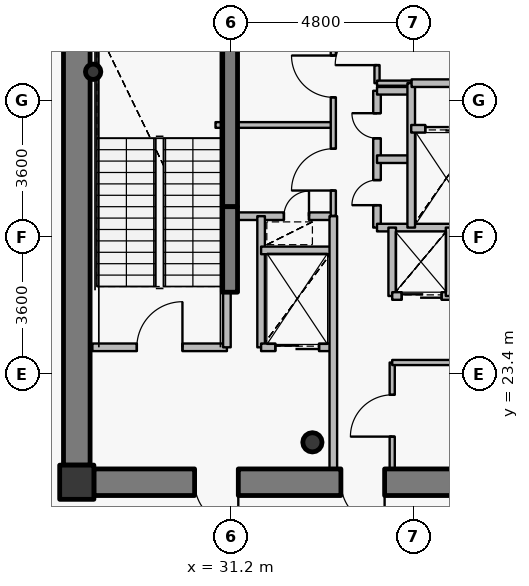
"""IFC4 building model, lengths in metres.
Left out: names, types, materials, properties, quantities, classifications, styles, units other than length and angle.
Written with IfcOpenShell. Run it as: python <this file> out.ifc"""

import sys

from ifc_helpers import new_model, si_unit, direction, frame, frame_2d, origin, origin_2d, place, context, subcontext, project, spatial, rectangle, hollow_circle, extrude, source, transform, mapped, element, fill, save


model = new_model("IFC4")
c1 = context("Model", 3, precision=1e-05, world=origin(), true_north=direction((0.0, 1.0)))
c2 = subcontext(c1, "Body", "Model", "MODEL_VIEW")
j1 = project(units=[si_unit("LENGTHUNIT", "METRE"), si_unit("PLANEANGLEUNIT", "RADIAN")], contexts=[c1])
p1 = place(None, origin())
s1 = spatial("IfcSite", under=j1, at=p1, CompositionType="ELEMENT")
p2 = place(p1, origin())
s2 = spatial("IfcBuilding", under=s1, at=p2, CompositionType="ELEMENT")
p3 = place(p2, frame((0.0, 0.0, 355.2)))
s3 = spatial("IfcBuildingStorey", under=s2, at=p3, CompositionType="ELEMENT", Elevation=355.2)
p4 = place(p3, frame((27.15, 20.55, 0.0), z_axis=(0.0, 0.0, 1.0), x_axis=(1.0, 0.0, 0.0)))
e1 = element("IfcColumn", 1, at=p4, inside=s3, PredefinedType="COLUMN", context=c2, shape_type="SweptSolid", body=[
    extrude(rectangle(XDim=0.9, YDim=0.9, at=origin_2d()), origin(), (0.0, 0.0, 1.0), 4.2),
])
p5 = place(p3, frame((33.35, 21.6, 0.0), z_axis=(0.0, 0.0, 1.0), x_axis=(1.0, 0.0, 0.0)))
e2 = element("IfcColumn", 2, at=p5, inside=s3, PredefinedType="COLUMN", context=c2, shape_type="SweptSolid", body=[
    extrude(hollow_circle(Radius=0.254, WallThickness=0.02, at=origin_2d()), origin(), (0.0, 0.0, 1.0), 4.2),
])
p6 = place(p3, frame((31.18, 27.8, 0.0), z_axis=(0.0, 0.0, 1.0), x_axis=(0.0, 1.0, 0.0)))
e3 = element("IfcWall", 3, at=p6, inside=s3, PredefinedType="SHEAR", context=c2, shape_type="SweptSolid", body=[
    extrude(rectangle(XDim=4.75, YDim=0.4, at=frame_2d((2.375, 0.0))), origin(), (0.0, 0.0, 1.0), 4.2),
])
p7 = place(p3, frame((27.58, 31.35, 0.0), z_axis=(0.0, 0.0, 1.0), x_axis=(1.0, 0.0, 0.0)))
e4 = element("IfcColumn", 4, at=p7, inside=s3, PredefinedType="COLUMN", context=c2, shape_type="SweptSolid", body=[
    extrude(hollow_circle(Radius=0.203, WallThickness=0.016, at=origin_2d()), origin(), (0.0, 0.0, 1.0), 4.2),
])
p8 = place(p3, frame((44.4, 20.55, 0.0), z_axis=(0.0, 0.0, 1.0), x_axis=(-1.0, 0.0, 0.0)))
e5 = element("IfcWall", 5, at=p8, inside=s3, PredefinedType="SHEAR", context=c2, shape_type="SweptSolid", body=[
    extrude(rectangle(XDim=16.8, YDim=0.7, at=frame_2d((8.4, 0.0))), origin(), (0.0, 0.0, 1.0), 3.5),
])
p9 = place(p8, frame((13.0, 0.0, 0.0)))
e6 = element("IfcOpeningElement", 6, at=p9, cuts=e5, PredefinedType="OPENING", context=c2, shape_type="SweptSolid", body=[
    extrude(rectangle(XDim=1.15, YDim=2.15, at=origin_2d()), frame((0.575, 0.36, 1.075), z_axis=(0.0, -1.0, 0.0), x_axis=(1.0, 0.0, 0.0)), (0.0, 0.0, 1.0), 0.72),
])
p10 = place(p8, frame((9.15, 0.0, 0.0)))
e7 = element("IfcOpeningElement", 7, at=p10, cuts=e5, PredefinedType="OPENING", context=c2, shape_type="SweptSolid", body=[
    extrude(rectangle(XDim=1.15, YDim=2.15, at=origin_2d()), frame((0.575, 0.36, 1.075), z_axis=(0.0, -1.0, 0.0), x_axis=(1.0, 0.0, 0.0)), (0.0, 0.0, 1.0), 0.72),
])
p11 = place(p3, frame((27.15, 21.0, 0.0), z_axis=(0.0, 0.0, 1.0), x_axis=(0.0, 1.0, 0.0)))
e8 = element("IfcWall", 8, at=p11, inside=s3, PredefinedType="SHEAR", context=c2, shape_type="SweptSolid", body=[
    extrude(rectangle(XDim=12.0, YDim=0.7, at=frame_2d((6.0, 0.0))), origin(), (0.0, 0.0, 1.0), 3.5),
])
p12 = place(p3, frame((31.18, 25.55, 0.0), z_axis=(0.0, 0.0, 1.0), x_axis=(0.0, 1.0, 0.0)))
e9 = element("IfcWall", 9, at=p12, inside=s3, PredefinedType="SHEAR", context=c2, shape_type="SweptSolid", body=[
    extrude(rectangle(XDim=2.25, YDim=0.4, at=frame_2d((1.125, 0.0))), origin(), (0.0, 0.0, 1.0), 3.55),
])
p13 = place(p3, frame((27.56, 24.1, 0.0), z_axis=(0.0, 0.0, 1.0), x_axis=(1.0, 0.0, 0.0)))
e10 = element("IfcWall", 10, at=p13, inside=s3, PredefinedType="PARTITIONING", context=c2, shape_type="SweptSolid", body=[
    extrude(rectangle(XDim=3.54, YDim=0.2, at=frame_2d((1.77, 0.0))), origin(), (0.0, 0.0, 1.0), 3.95),
])
p14 = place(p13, frame((1.17, 0.0, 0.0)))
e11 = element("IfcOpeningElement", 11, at=p14, cuts=e10, PredefinedType="OPENING", context=c2, shape_type="SweptSolid", body=[
    extrude(rectangle(XDim=1.2, YDim=2.15, at=origin_2d()), frame((0.6, 0.11, 1.075), z_axis=(0.0, -1.0, 0.0), x_axis=(1.0, 0.0, 0.0)), (0.0, 0.0, 1.0), 0.22),
])
p15 = place(p3, frame((30.8, 29.95, 0.0), z_axis=(0.0, 0.0, 1.0), x_axis=(1.0, 0.0, 0.0)))
e12 = element("IfcWall", 12, at=p15, inside=s3, PredefinedType="PARTITIONING", context=c2, shape_type="SweptSolid", body=[
    extrude(rectangle(XDim=3.1, YDim=0.15, at=frame_2d((1.55, 0.0))), origin(), (0.0, 0.0, 1.0), 3.535),
])
p16 = place(p3, frame((31.1, 24.1, 0.0), z_axis=(0.0, 0.0, 1.0), x_axis=(0.0, 1.0, 0.0)))
e13 = element("IfcWall", 13, at=p16, inside=s3, PredefinedType="PARTITIONING", context=c2, shape_type="SweptSolid", body=[
    extrude(rectangle(XDim=1.44, YDim=0.2, at=frame_2d((0.72, 0.0))), origin(), (0.0, 0.0, 1.0), 3.95),
])
p17 = place(p3, frame((31.1, 27.55, 0.0), z_axis=(0.0, 0.0, 1.0), x_axis=(1.0, 0.0, 0.0)))
e14 = element("IfcWall", 14, at=p17, inside=s3, PredefinedType="PARTITIONING", context=c2, shape_type="SweptSolid", body=[
    extrude(rectangle(XDim=2.8, YDim=0.2, at=frame_2d((1.4, 0.0))), origin(), (0.0, 0.0, 1.0), 3.535),
])
p18 = place(p17, frame((1.5, 0.0, 0.0)))
e15 = element("IfcOpeningElement", 15, at=p18, cuts=e14, PredefinedType="OPENING", context=c2, shape_type="SweptSolid", body=[
    extrude(rectangle(XDim=0.66, YDim=2.05, at=origin_2d()), frame((0.33, 0.11, 1.025), z_axis=(0.0, -1.0, 0.0), x_axis=(1.0, 0.0, 0.0)), (0.0, 0.0, 1.0), 0.22),
])
p19 = place(p3, frame((32.0, 24.1, 0.0), z_axis=(0.0, 0.0, 1.0), x_axis=(0.0, 1.0, 0.0)))
e16 = element("IfcWall", 16, at=p19, inside=s3, PredefinedType="PARTITIONING", context=c2, shape_type="SweptSolid", body=[
    extrude(rectangle(XDim=3.45, YDim=0.2, at=frame_2d((1.725, 0.0))), origin(), (0.0, 0.0, 1.0), 3.95),
])
p20 = place(p3, frame((32.0, 24.1, 0.0), z_axis=(0.0, 0.0, 1.0), x_axis=(1.0, 0.0, 0.0)))
e17 = element("IfcWall", 17, at=p20, inside=s3, PredefinedType="PARTITIONING", context=c2, shape_type="SweptSolid", body=[
    extrude(rectangle(XDim=1.9, YDim=0.2, at=frame_2d((0.95, 0.0))), origin(), (0.0, 0.0, 1.0), 3.535),
])
p21 = place(p20, frame((0.375, 0.0, 0.0)))
e18 = element("IfcOpeningElement", 18, at=p21, cuts=e17, PredefinedType="OPENING", context=c2, shape_type="SweptSolid", body=[
    extrude(rectangle(XDim=1.15, YDim=2.15, at=origin_2d()), frame((0.575, 0.11, 1.075), z_axis=(0.0, -1.0, 0.0), x_axis=(1.0, 0.0, 0.0)), (0.0, 0.0, 1.0), 0.22),
])
p22 = place(p3, frame((32.0, 26.65, 0.0), z_axis=(0.0, 0.0, 1.0), x_axis=(1.0, 0.0, 0.0)))
e19 = element("IfcWall", 19, at=p22, inside=s3, PredefinedType="PARTITIONING", context=c2, shape_type="SweptSolid", body=[
    extrude(rectangle(XDim=1.9, YDim=0.2, at=frame_2d((0.95, 0.0))), origin(), (0.0, 0.0, 1.0), 3.535),
])
p23 = place(p3, frame((33.9, 20.9, 0.0), z_axis=(0.0, 0.0, 1.0), x_axis=(0.0, 1.0, 0.0)))
e20 = element("IfcWall", 20, at=p23, inside=s3, PredefinedType="PARTITIONING", context=c2, shape_type="SweptSolid", body=[
    extrude(rectangle(XDim=6.65, YDim=0.2, at=frame_2d((3.325, 0.0))), origin(), (0.0, 0.0, 1.0), 3.535),
])
p24 = place(p3, frame((33.9, 27.56, 0.0), z_axis=(0.0, 0.0, 1.0), x_axis=(0.0, 1.0, 0.0)))
e21 = element("IfcWall", 21, at=p24, inside=s3, PredefinedType="PARTITIONING", context=c2, shape_type="SweptSolid", body=[
    extrude(rectangle(XDim=5.54, YDim=0.135, at=frame_2d((2.77, 0.0))), origin(), (0.0, 0.0, 1.0), 3.535),
])
p25 = place(p24, frame((0.665, 0.0, 0.0)))
e22 = element("IfcOpeningElement", 22, at=p25, cuts=e21, PredefinedType="OPENING", context=c2, shape_type="SweptSolid", body=[
    extrude(rectangle(XDim=1.1, YDim=2.15, at=origin_2d()), frame((0.55, 0.078, 1.075), z_axis=(0.0, -1.0, 0.0), x_axis=(1.0, 0.0, 0.0)), (0.0, 0.0, 1.0), 0.155),
])
p26 = place(p24, frame((3.117, 0.0, 0.0)))
e23 = element("IfcOpeningElement", 23, at=p26, cuts=e21, PredefinedType="OPENING", context=c2, shape_type="SweptSolid", body=[
    extrude(rectangle(XDim=1.1, YDim=2.15, at=origin_2d()), frame((0.55, 0.078, 1.075), z_axis=(0.0, -1.0, 0.0), x_axis=(1.0, 0.0, 0.0)), (0.0, 0.0, 1.0), 0.155),
])
p27 = place(p3, frame((35.05, 27.25, 0.0), z_axis=(0.0, 0.0, 1.0), x_axis=(0.0, 1.0, 0.0)))
e24 = element("IfcWall", 24, at=p27, inside=s3, PredefinedType="PARTITIONING", context=c2, shape_type="SweptSolid", body=[
    extrude(rectangle(XDim=3.6, YDim=0.2, at=frame_2d((1.8, 0.0))), origin(), (0.0, 0.0, 1.0), 3.95),
])
p28 = place(p27, frame((0.59, 0.0, 0.0)))
e25 = element("IfcOpeningElement", 25, at=p28, cuts=e24, PredefinedType="OPENING", context=c2, shape_type="SweptSolid", body=[
    extrude(rectangle(XDim=0.66, YDim=2.05, at=origin_2d()), frame((0.33, 0.11, 1.025), z_axis=(0.0, -1.0, 0.0), x_axis=(1.0, 0.0, 0.0)), (0.0, 0.0, 1.0), 0.22),
])
p29 = place(p27, frame((2.35, 0.0, 0.0)))
e26 = element("IfcOpeningElement", 26, at=p29, cuts=e24, PredefinedType="OPENING", context=c2, shape_type="SweptSolid", body=[
    extrude(rectangle(XDim=0.66, YDim=2.05, at=origin_2d()), frame((0.33, 0.11, 1.025), z_axis=(0.0, -1.0, 0.0), x_axis=(1.0, 0.0, 0.0)), (0.0, 0.0, 1.0), 0.22),
])
p30 = place(p3, frame((35.05, 27.25, 0.0), z_axis=(0.0, 0.0, 1.0), x_axis=(1.0, 0.0, 0.0)))
e27 = element("IfcWall", 27, at=p30, inside=s3, PredefinedType="PARTITIONING", context=c2, shape_type="SweptSolid", body=[
    extrude(rectangle(XDim=4.95, YDim=0.2, at=frame_2d((2.475, 0.0))), origin(), (0.0, 0.0, 1.0), 3.535),
])
for number, where, z_axis, x_axis in (
    (28, (35.05, 29.05, 0.0), (0.0, 0.0, 1.0), (1.0, 0.0, 0.0)),
    (29, (35.05, 30.85, 0.0), (0.0, 0.0, 1.0), (1.0, 0.0, 0.0)),
):
    element("IfcWall", number, at=place(p3, frame(where, z_axis=z_axis, x_axis=x_axis)), inside=s3, PredefinedType="PARTITIONING", context=c2, shape_type="SweptSolid", body=[
        extrude(rectangle(XDim=0.9, YDim=0.2, at=frame_2d((0.45, 0.0))), origin(), (0.0, 0.0, 1.0), 3.95),
    ])
p31 = place(p3, frame((35.05, 31.05, 0.0), z_axis=(0.0, 0.0, 1.0), x_axis=(0.0, 1.0, 0.0)))
e30 = element("IfcWall", 30, at=p31, inside=s3, PredefinedType="PARTITIONING", context=c2, shape_type="SweptSolid", body=[
    extrude(rectangle(XDim=2.05, YDim=0.135, at=frame_2d((1.025, 0.0))), origin(), (0.0, 0.0, 1.0), 3.535),
])
p32 = place(p31, frame((0.475, 0.0, 0.0)))
e31 = element("IfcOpeningElement", 31, at=p32, cuts=e30, PredefinedType="OPENING", context=c2, shape_type="SweptSolid", body=[
    extrude(rectangle(XDim=1.1, YDim=2.15, at=origin_2d()), frame((0.55, 0.078, 1.075), z_axis=(0.0, -1.0, 0.0), x_axis=(1.0, 0.0, 0.0)), (0.0, 0.0, 1.0), 0.155),
])
p33 = place(p3, frame((35.05, 31.05, 0.0), z_axis=(0.0, 0.0, 1.0), x_axis=(1.0, 0.0, 0.0)))
e32 = element("IfcWall", 32, at=p33, inside=s3, PredefinedType="PARTITIONING", context=c2, shape_type="SweptSolid", body=[
    extrude(rectangle(XDim=0.9, YDim=0.135, at=frame_2d((0.45, 0.0))), origin(), (0.0, 0.0, 1.0), 3.95),
])
p34 = place(p3, frame((35.45, 20.9, 0.0), z_axis=(0.0, 0.0, 1.0), x_axis=(0.0, 1.0, 0.0)))
e33 = element("IfcWall", 33, at=p34, inside=s3, PredefinedType="PARTITIONING", context=c2, shape_type="SweptSolid", body=[
    extrude(rectangle(XDim=2.8, YDim=0.135, at=frame_2d((1.4, 0.0))), origin(), (0.0, 0.0, 1.0), 3.535),
])
p35 = place(p34, frame((0.85, 0.0, 0.0)))
e34 = element("IfcOpeningElement", 34, at=p35, cuts=e33, PredefinedType="OPENING", context=c2, shape_type="SweptSolid", body=[
    extrude(rectangle(XDim=1.1, YDim=2.15, at=origin_2d()), frame((0.55, 0.078, 1.075), z_axis=(0.0, -1.0, 0.0), x_axis=(1.0, 0.0, 0.0)), (0.0, 0.0, 1.0), 0.155),
])
p36 = place(p3, frame((35.45, 23.7, 0.0), z_axis=(0.0, 0.0, 1.0), x_axis=(1.0, 0.0, 0.0)))
e35 = element("IfcWall", 35, at=p36, inside=s3, PredefinedType="PARTITIONING", context=c2, shape_type="SweptSolid", body=[
    extrude(rectangle(XDim=4.35, YDim=0.135, at=frame_2d((2.175, 0.0))), origin(), (0.0, 0.0, 1.0), 3.535),
])
p37 = place(p36, frame((2.905, 0.0, 0.0)))
e36 = element("IfcOpeningElement", 36, at=p37, cuts=e35, PredefinedType="OPENING", context=c2, shape_type="SweptSolid", body=[
    extrude(rectangle(XDim=1.1, YDim=2.15, at=origin_2d()), frame((0.55, 0.078, 1.075), z_axis=(0.0, -1.0, 0.0), x_axis=(1.0, 0.0, 0.0)), (0.0, 0.0, 1.0), 0.155),
])
p38 = place(p3, frame((35.45, 25.45, 0.0), z_axis=(0.0, 0.0, 1.0), x_axis=(0.0, 1.0, 0.0)))
e37 = element("IfcWall", 37, at=p38, inside=s3, PredefinedType="PARTITIONING", context=c2, shape_type="SweptSolid", body=[
    extrude(rectangle(XDim=1.8, YDim=0.2, at=frame_2d((0.9, 0.0))), origin(), (0.0, 0.0, 1.0), 3.95),
])
p39 = place(p3, frame((35.45, 25.45, 0.0), z_axis=(0.0, 0.0, 1.0), x_axis=(1.0, 0.0, 0.0)))
e38 = element("IfcWall", 38, at=p39, inside=s3, PredefinedType="PARTITIONING", context=c2, shape_type="SweptSolid", body=[
    extrude(rectangle(XDim=4.55, YDim=0.2, at=frame_2d((2.275, 0.0))), origin(), (0.0, 0.0, 1.0), 3.535),
])
p40 = place(p39, frame((0.25, 0.0, 0.0)))
e39 = element("IfcOpeningElement", 39, at=p40, cuts=e38, PredefinedType="OPENING", context=c2, shape_type="SweptSolid", body=[
    extrude(rectangle(XDim=1.05, YDim=2.15, at=origin_2d()), frame((0.525, 0.11, 1.075), z_axis=(0.0, -1.0, 0.0), x_axis=(1.0, 0.0, 0.0)), (0.0, 0.0, 1.0), 0.22),
])
p41 = place(p39, frame((1.745, 0.0, 0.0)))
e40 = element("IfcOpeningElement", 40, at=p41, cuts=e38, PredefinedType="OPENING", context=c2, shape_type="SweptSolid", body=[
    extrude(rectangle(XDim=1.05, YDim=2.15, at=origin_2d()), frame((0.525, 0.11, 1.075), z_axis=(0.0, -1.0, 0.0), x_axis=(1.0, 0.0, 0.0)), (0.0, 0.0, 1.0), 0.22),
])
p42 = place(p39, frame((3.165, 0.0, 0.0)))
e41 = element("IfcOpeningElement", 41, at=p42, cuts=e38, PredefinedType="OPENING", context=c2, shape_type="SweptSolid", body=[
    extrude(rectangle(XDim=1.05, YDim=2.15, at=origin_2d()), frame((0.525, 0.11, 1.075), z_axis=(0.0, -1.0, 0.0), x_axis=(1.0, 0.0, 0.0)), (0.0, 0.0, 1.0), 0.22),
])
p43 = place(p3, frame((35.95, 27.25, 0.0), z_axis=(0.0, 0.0, 1.0), x_axis=(0.0, 1.0, 0.0)))
e42 = element("IfcWall", 42, at=p43, inside=s3, PredefinedType="PARTITIONING", context=c2, shape_type="SweptSolid", body=[
    extrude(rectangle(XDim=3.8, YDim=0.2, at=frame_2d((1.9, 0.0))), origin(), (0.0, 0.0, 1.0), 3.95),
])
p44 = place(p3, frame((35.95, 29.85, 0.0), z_axis=(0.0, 0.0, 1.0), x_axis=(1.0, 0.0, 0.0)))
e43 = element("IfcWall", 43, at=p44, inside=s3, PredefinedType="PARTITIONING", context=c2, shape_type="SweptSolid", body=[
    extrude(rectangle(XDim=8.49, YDim=0.2, at=frame_2d((4.245, 0.0))), origin(), (0.0, 0.0, 1.0), 3.535),
])
p45 = place(p44, frame((6.1, 0.0, 0.0)))
e44 = element("IfcOpeningElement", 44, at=p45, cuts=e43, PredefinedType="OPENING", context=c2, shape_type="SweptSolid", body=[
    extrude(rectangle(XDim=1.2, YDim=2.15, at=origin_2d()), frame((0.6, 0.11, 1.075), z_axis=(0.0, -1.0, 0.0), x_axis=(1.0, 0.0, 0.0)), (0.0, 0.0, 1.0), 0.22),
])
p46 = place(p44, frame((0.37, 0.0, 0.0)))
e45 = element("IfcOpeningElement", 45, at=p46, cuts=e43, PredefinedType="OPENING", context=c2, shape_type="SweptSolid", body=[
    extrude(rectangle(XDim=1.15, YDim=2.15, at=origin_2d()), frame((0.575, 0.11, 1.075), z_axis=(0.0, -1.0, 0.0), x_axis=(1.0, 0.0, 0.0)), (0.0, 0.0, 1.0), 0.22),
])
p47 = place(p44, frame((2.425, 0.0, 0.0)))
e46 = element("IfcOpeningElement", 46, at=p47, cuts=e43, PredefinedType="OPENING", context=c2, shape_type="SweptSolid", body=[
    extrude(rectangle(XDim=1.05, YDim=2.15, at=origin_2d()), frame((0.525, 0.11, 1.075), z_axis=(0.0, -1.0, 0.0), x_axis=(1.0, 0.0, 0.0)), (0.0, 0.0, 1.0), 0.22),
])
p48 = place(p3, frame((35.96, 31.05, 0.0), z_axis=(0.0, 0.0, 1.0), x_axis=(1.0, 0.0, 0.0)))
e47 = element("IfcWall", 47, at=p48, inside=s3, PredefinedType="PARTITIONING", context=c2, shape_type="SweptSolid", body=[
    extrude(rectangle(XDim=1.84, YDim=0.2, at=frame_2d((0.92, 0.0))), origin(), (0.0, 0.0, 1.0), 3.95),
])
p49 = place(p3, frame((36.96, 25.45, 0.0), z_axis=(0.0, 0.0, 1.0), x_axis=(0.0, 1.0, 0.0)))
e48 = element("IfcWall", 48, at=p49, inside=s3, PredefinedType="PARTITIONING", context=c2, shape_type="SweptSolid", body=[
    extrude(rectangle(XDim=1.8, YDim=0.2, at=frame_2d((0.9, 0.0))), origin(), (0.0, 0.0, 1.0), 3.95),
])
p50 = place(p3, frame((26.8, 20.99, 0.0), z_axis=(0.0, 0.0, 1.0), x_axis=(0.0, -1.0, 0.0)))
e49 = element("IfcWall", 49, at=p50, inside=s3, PredefinedType="PARTITIONING", context=c2, shape_type="SweptSolid", body=[
    extrude(rectangle(XDim=0.79, YDim=0.135, at=frame_2d((0.395, 0.0))), origin(), (0.0, 0.0, 1.0), 3.485),
])
p51 = place(p3, frame((27.107, 20.2, 0.0), z_axis=(0.0, 0.0, 1.0), x_axis=(1.0, 0.0, 0.0)))
e50 = element("IfcWall", 50, at=p51, inside=s3, PredefinedType="PARTITIONING", context=c2, shape_type="SweptSolid", body=[
    extrude(rectangle(XDim=0.483, YDim=0.135, at=frame_2d((0.241, 0.0))), origin(), (0.0, 0.0, 1.0), 3.485),
])
m1 = source(origin(), c2, "Body", "SweptSolid", [
    extrude(rectangle(XDim=1.15, YDim=2.15, at=origin_2d()), frame((0.575, 0.025, 1.075), z_axis=(0.0, -1.0, 0.0), x_axis=(1.0, 0.0, 0.0)), (0.0, 0.0, 1.0), 0.05),
])
p52 = place(p9, origin())
e51 = element("IfcDoor", 51, at=p52, inside=s3, OperationType="SINGLE_SWING_LEFT", PredefinedType="DOOR", context=c2, shape_type="MappedRepresentation", body=[
    mapped(m1, transform((0.0, 0.0, 0.0), x_axis=(1.0, 0.0, 0.0), y_axis=(0.0, 1.0, 0.0), z_axis=(0.0, 0.0, 1.0), scale=1.0)),
])
fill(e6, e51)
p53 = place(p10, origin())
e52 = element("IfcDoor", 52, at=p53, inside=s3, OperationType="SINGLE_SWING_LEFT", PredefinedType="DOOR", context=c2, shape_type="MappedRepresentation", body=[
    mapped(m1, transform((0.0, 0.0, 0.0), x_axis=(1.0, 0.0, 0.0), y_axis=(0.0, 1.0, 0.0), z_axis=(0.0, 0.0, 1.0), scale=1.0)),
])
fill(e7, e52)
m2 = source(origin(), c2, "Body", "SweptSolid", [
    extrude(rectangle(XDim=1.2, YDim=2.15, at=origin_2d()), frame((0.6, 0.025, 1.075), z_axis=(0.0, -1.0, 0.0), x_axis=(1.0, 0.0, 0.0)), (0.0, 0.0, 1.0), 0.05),
])
p54 = place(p14, origin())
e53 = element("IfcDoor", 53, at=p54, inside=s3, OperationType="SINGLE_SWING_RIGHT", PredefinedType="DOOR", context=c2, shape_type="MappedRepresentation", body=[
    mapped(m2, transform((0.0, 0.0, 0.0), x_axis=(1.0, 0.0, 0.0), y_axis=(0.0, 1.0, 0.0), z_axis=(0.0, 0.0, 1.0), scale=1.0)),
])
fill(e11, e53)
m3 = source(origin(), c2, "Body", "SweptSolid", [
    extrude(rectangle(XDim=1.15, YDim=2.15, at=origin_2d()), frame((0.575, 0.025, 1.075), z_axis=(0.0, -1.0, 0.0), x_axis=(1.0, 0.0, 0.0)), (0.0, 0.0, 1.0), 0.05),
])
p55 = place(p46, origin())
e54 = element("IfcDoor", 54, at=p55, inside=s3, OperationType="DOUBLE_DOOR_SLIDING", PredefinedType="USERDEFINED", context=c2, shape_type="MappedRepresentation", body=[
    mapped(m3, transform((0.0, 0.0, 0.0), x_axis=(1.0, 0.0, 0.0), y_axis=(0.0, 1.0, 0.0), z_axis=(0.0, 0.0, 1.0), scale=1.0)),
])
fill(e45, e54)
p56 = place(p21, origin())
e55 = element("IfcDoor", 55, at=p56, inside=s3, OperationType="DOUBLE_DOOR_SLIDING", PredefinedType="USERDEFINED", context=c2, shape_type="MappedRepresentation", body=[
    mapped(m3, transform((0.0, 0.0, 0.0), x_axis=(1.0, 0.0, 0.0), y_axis=(0.0, 1.0, 0.0), z_axis=(0.0, 0.0, 1.0), scale=1.0)),
])
fill(e18, e55)
m4 = source(origin(), c2, "Body", "SweptSolid", [
    extrude(rectangle(XDim=1.05, YDim=2.15, at=origin_2d()), frame((0.525, 0.025, 1.075), z_axis=(0.0, -1.0, 0.0), x_axis=(1.0, 0.0, 0.0)), (0.0, 0.0, 1.0), 0.05),
])
p57 = place(p40, origin())
e56 = element("IfcDoor", 56, at=p57, inside=s3, OperationType="DOUBLE_DOOR_SLIDING", PredefinedType="USERDEFINED", context=c2, shape_type="MappedRepresentation", body=[
    mapped(m4, transform((0.0, 0.0, 0.0), x_axis=(1.0, 0.0, 0.0), y_axis=(0.0, 1.0, 0.0), z_axis=(0.0, 0.0, 1.0), scale=1.0)),
])
fill(e39, e56)
m5 = source(origin(), c2, "Body", "SweptSolid", [
    extrude(rectangle(XDim=0.66, YDim=2.05, at=origin_2d()), frame((0.33, 0.025, 1.025), z_axis=(0.0, -1.0, 0.0), x_axis=(1.0, 0.0, 0.0)), (0.0, 0.0, 1.0), 0.05),
])
p58 = place(p28, origin())
e57 = element("IfcDoor", 57, at=p58, inside=s3, OperationType="SINGLE_SWING_LEFT", PredefinedType="USERDEFINED", context=c2, shape_type="MappedRepresentation", body=[
    mapped(m5, transform((0.0, 0.0, 0.0), x_axis=(1.0, 0.0, 0.0), y_axis=(0.0, 1.0, 0.0), z_axis=(0.0, 0.0, 1.0), scale=1.0)),
])
fill(e25, e57)
p59 = place(p29, origin())
e58 = element("IfcDoor", 58, at=p59, inside=s3, OperationType="SINGLE_SWING_RIGHT", PredefinedType="USERDEFINED", context=c2, shape_type="MappedRepresentation", body=[
    mapped(m5, transform((0.0, 0.0, 0.0), x_axis=(1.0, 0.0, 0.0), y_axis=(0.0, 1.0, 0.0), z_axis=(0.0, 0.0, 1.0), scale=1.0)),
])
fill(e26, e58)
m6 = source(origin(), c2, "Body", "SweptSolid", [
    extrude(rectangle(XDim=1.1, YDim=2.15, at=origin_2d()), frame((0.55, 0.025, 1.075), z_axis=(0.0, -1.0, 0.0), x_axis=(1.0, 0.0, 0.0)), (0.0, 0.0, 1.0), 0.05),
])
p60 = place(p35, origin())
e59 = element("IfcDoor", 59, at=p60, inside=s3, OperationType="SINGLE_SWING_LEFT", PredefinedType="DOOR", context=c2, shape_type="MappedRepresentation", body=[
    mapped(m6, transform((0.0, 0.0, 0.0), x_axis=(1.0, 0.0, 0.0), y_axis=(0.0, 1.0, 0.0), z_axis=(0.0, 0.0, 1.0), scale=1.0)),
])
fill(e34, e59)
p61 = place(p25, origin())
e60 = element("IfcDoor", 60, at=p61, inside=s3, OperationType="SINGLE_SWING_LEFT", PredefinedType="DOOR", context=c2, shape_type="MappedRepresentation", body=[
    mapped(m6, transform((0.0, 0.0, 0.0), x_axis=(1.0, 0.0, 0.0), y_axis=(0.0, 1.0, 0.0), z_axis=(0.0, 0.0, 1.0), scale=1.0)),
])
fill(e22, e60)
p62 = place(p26, origin())
e61 = element("IfcDoor", 61, at=p62, inside=s3, OperationType="SINGLE_SWING_RIGHT", PredefinedType="DOOR", context=c2, shape_type="MappedRepresentation", body=[
    mapped(m6, transform((0.0, 0.0, 0.0), x_axis=(1.0, 0.0, 0.0), y_axis=(0.0, 1.0, 0.0), z_axis=(0.0, 0.0, 1.0), scale=1.0)),
])
fill(e23, e61)
p63 = place(p32, origin())
e62 = element("IfcDoor", 62, at=p63, inside=s3, OperationType="SINGLE_SWING_LEFT", PredefinedType="DOOR", context=c2, shape_type="MappedRepresentation", body=[
    mapped(m6, transform((0.0, 0.0, 0.0), x_axis=(1.0, 0.0, 0.0), y_axis=(0.0, 1.0, 0.0), z_axis=(0.0, 0.0, 1.0), scale=1.0)),
])
fill(e31, e62)
p64 = place(p18, origin())
e63 = element("IfcDoor", 63, at=p64, inside=s3, OperationType="SINGLE_SWING_RIGHT", PredefinedType="USERDEFINED", context=c2, shape_type="MappedRepresentation", body=[
    mapped(m5, transform((0.0, 0.0, 0.0), x_axis=(1.0, 0.0, 0.0), y_axis=(0.0, 1.0, 0.0), z_axis=(0.0, 0.0, 1.0), scale=1.0)),
])
fill(e15, e63)
save(model, sys.argv[1])
